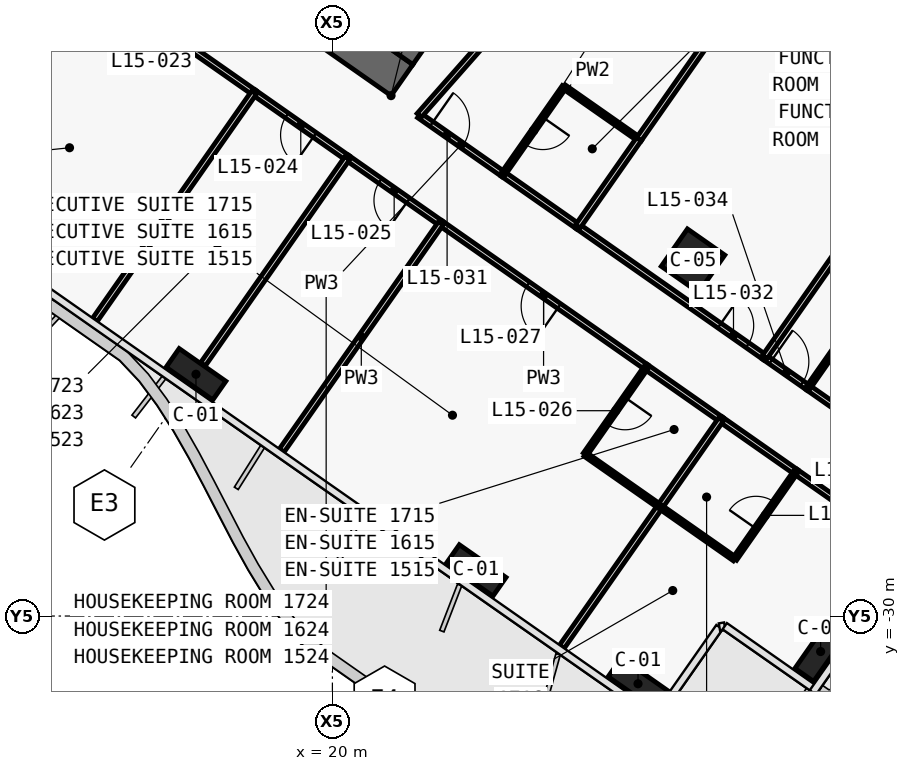
"""IFC4 building model, lengths in metres.
Left out: names, types, materials, properties, quantities, classifications, styles, units other than length and angle.
Written with IfcOpenShell. Run it as: python <this file> out.ifc"""

import sys

from ifc_helpers import new_model, si_unit, direction, frame, frame_2d, origin, origin_2d, place, context, subcontext, project, spatial, polyline, rectangle, outline, extrude, element, fill, save


model = new_model("IFC4")
c1 = context("Model", 3, precision=1e-05, world=origin(), true_north=direction((0.0, 1.0)))
c2 = subcontext(c1, "Body", "Model", "MODEL_VIEW")
j1 = project(units=[si_unit("LENGTHUNIT", "METRE"), si_unit("PLANEANGLEUNIT", "RADIAN")], contexts=[c1])
p1 = place(None, origin())
s1 = spatial("IfcSite", under=j1, at=p1, CompositionType="ELEMENT")
p2 = place(p1, origin())
s2 = spatial("IfcBuilding", under=s1, at=p2, CompositionType="ELEMENT")
p3 = place(p2, frame((0.0, 0.0, 79.7)))
s3 = spatial("IfcBuildingStorey", under=s2, at=p3, CompositionType="ELEMENT", Elevation=79.7)
p4 = place(p3, frame((-0.037, -0.585, 0.0), z_axis=(0.0, 0.0, 1.0), x_axis=(0.819157152511, -0.573569140985, 0.0)))
e1 = element("IfcWall", 1, at=p4, inside=s3, PredefinedType="SHEAR", context=c2, shape_type="SweptSolid", body=[
    extrude(outline(polyline([(26.695, 0.5), (0.0, 0.5), (0.7, -0.5), (26.695, -0.5), (26.695, 0.5)])), origin(), (0.0, 0.0, 1.0), 3.6),
])
p5 = place(p4, frame((1.245, 0.0, 0.0)))
e2 = element("IfcOpeningElement", 2, at=p5, cuts=e1, PredefinedType="OPENING", context=c2, shape_type="SweptSolid", body=[
    extrude(rectangle(XDim=1.5, YDim=2.1, at=frame_2d((0.75, 1.05))), frame((0.0, 0.51, 0.0), z_axis=(0.0, -1.0, 0.0), x_axis=(1.0, 0.0, 0.0)), (0.0, 0.0, 1.0), 1.02),
])
p6 = place(p4, frame((12.445, 0.0, 0.0)))
e3 = element("IfcOpeningElement", 3, at=p6, cuts=e1, PredefinedType="OPENING", context=c2, shape_type="SweptSolid", body=[
    extrude(rectangle(XDim=1.5, YDim=2.1, at=frame_2d((0.75, 1.05))), frame((0.0, 0.51, 0.0), z_axis=(0.0, -1.0, 0.0), x_axis=(1.0, 0.0, 0.0)), (0.0, 0.0, 1.0), 1.02),
])
p7 = place(p3, frame((21.708, -15.2, 0.0), z_axis=(0.0, 0.0, 1.0), x_axis=(0.573576324356, 0.819152122709, 0.0)))
e4 = element("IfcWall", 4, at=p7, inside=s3, PredefinedType="SHEAR", context=c2, shape_type="SweptSolid", body=[
    extrude(outline(polyline([(9.2, 0.5), (0.0, 0.5), (0.0, -0.5), (9.2, -0.5), (9.2, 0.5)])), origin(), (0.0, 0.0, 1.0), 3.6),
])
p8 = place(p7, frame((6.1, 0.0, 0.0)))
e5 = element("IfcOpeningElement", 5, at=p8, cuts=e4, PredefinedType="OPENING", context=c2, shape_type="SweptSolid", body=[
    extrude(rectangle(XDim=1.8, YDim=2.1, at=frame_2d((0.9, 1.05))), frame((0.0, 0.51, 0.0), z_axis=(0.0, -1.0, 0.0), x_axis=(1.0, 0.0, 0.0)), (0.0, 0.0, 1.0), 1.02),
])
p9 = place(p7, frame((1.9, 0.0, 0.0)))
e6 = element("IfcOpeningElement", 6, at=p9, cuts=e4, PredefinedType="OPENING", context=c2, shape_type="SweptSolid", body=[
    extrude(rectangle(XDim=1.8, YDim=2.1, at=frame_2d((0.9, 1.05))), frame((0.0, 0.51, 0.0), z_axis=(0.0, -1.0, 0.0), x_axis=(1.0, 0.0, 0.0)), (0.0, 0.0, 1.0), 1.02),
])
for number, where, z_axis, x_axis in (
    (7, (16.41, -23.637, 0.0), (0.0, 0.0, 1.0), (0.819, -0.574, 0.0)),
    (8, (23.782, -28.799, 0.0), (0.0, 0.0, 1.0), (0.819, -0.574, 0.0)),
    (9, (28.042, -31.782, 0.0), (0.0, 0.0, 1.0), (0.819, -0.574, 0.0)),
    (10, (32.847, -30.935, 0.0), (0.0, 0.0, 1.0), (0.574, 0.819, 0.0)),
):
    element("IfcColumn", number, at=place(p3, frame(where, z_axis=z_axis, x_axis=x_axis)), inside=s3, PredefinedType="COLUMN", context=c2, shape_type="SweptSolid", body=[
        extrude(rectangle(XDim=1.5, YDim=0.6, at=origin_2d()), origin(), (0.0, 0.0, 1.0), 3.6),
    ])
p10 = place(p3, frame((29.49, -20.649, 0.0), z_axis=(0.0, 0.0, 1.0), x_axis=(0.819152044289, -0.573576436351, 0.0)))
e11 = element("IfcColumn", 11, at=p10, inside=s3, PredefinedType="COLUMN", context=c2, shape_type="SweptSolid", body=[
    extrude(rectangle(XDim=1.2, YDim=1.2, at=origin_2d()), origin(), (0.0, 0.0, 1.0), 3.6),
])
p11 = place(p3, frame((22.284, -16.824, 0.0), z_axis=(0.0, 0.0, 1.0), x_axis=(0.819176640776, -0.573541307325, 0.0)))
e12 = element("IfcWall", 12, at=p11, inside=s3, PredefinedType="PARTITIONING", context=c2, shape_type="SweptSolid", body=[
    extrude(rectangle(XDim=2.698, YDim=0.15, at=frame_2d((1.349, 0.0))), origin(), (0.0, 0.0, 1.0), 3.32),
])
p12 = place(p11, frame((0.396, 0.0, 0.0)))
e13 = element("IfcOpeningElement", 13, at=p12, cuts=e12, PredefinedType="OPENING", context=c2, shape_type="SweptSolid", body=[
    extrude(rectangle(XDim=1.0, YDim=2.1, at=frame_2d((0.5, 1.05))), frame((0.0, 0.085, 0.0), z_axis=(0.0, -1.0, 0.0), x_axis=(1.0, 0.0, 0.0)), (0.0, 0.0, 1.0), 0.17),
])
p13 = place(p3, frame((24.491, -18.369, 0.0), z_axis=(0.0, 0.0, 1.0), x_axis=(0.819179439794, -0.573537309527, 0.0)))
e14 = element("IfcWall", 14, at=p13, inside=s3, PredefinedType="PARTITIONING", context=c2, shape_type="SweptSolid", body=[
    extrude(rectangle(XDim=2.404, YDim=0.15, at=frame_2d((1.202, 0.0))), origin(), (0.0, 0.0, 1.0), 3.32),
])
p14 = place(p3, frame((26.457, -19.746, 0.0), z_axis=(0.0, 0.0, 1.0), x_axis=(0.819165052243, -0.573557858619, 0.0)))
e15 = element("IfcWall", 15, at=p14, inside=s3, PredefinedType="PARTITIONING", context=c2, shape_type="SweptSolid", body=[
    extrude(rectangle(XDim=6.004, YDim=0.15, at=frame_2d((3.002, 0.0))), origin(), (0.0, 0.0, 1.0), 2.6),
])
p15 = place(p14, frame((4.552, 0.0, 0.0)))
e16 = element("IfcOpeningElement", 16, at=p15, cuts=e15, PredefinedType="OPENING", context=c2, shape_type="SweptSolid", body=[
    extrude(rectangle(XDim=0.9, YDim=2.1, at=frame_2d((0.45, 1.05))), frame((0.0, 0.085, 0.0), z_axis=(0.0, -1.0, 0.0), x_axis=(1.0, 0.0, 0.0)), (0.0, 0.0, 1.0), 0.17),
])
p16 = place(p3, frame((31.372, -23.188, 0.0), z_axis=(0.0, 0.0, 1.0), x_axis=(0.819199220913, -0.573509055252, 0.0)))
e17 = element("IfcWall", 17, at=p16, inside=s3, PredefinedType="PARTITIONING", context=c2, shape_type="SweptSolid", body=[
    extrude(rectangle(XDim=1.403, YDim=0.15, at=frame_2d((0.702, 0.0))), origin(), (0.0, 0.0, 1.0), 3.32),
])
p17 = place(p16, frame((0.202, 0.0, 0.0)))
e18 = element("IfcOpeningElement", 18, at=p17, cuts=e17, PredefinedType="OPENING", context=c2, shape_type="SweptSolid", body=[
    extrude(rectangle(XDim=1.0, YDim=2.1, at=frame_2d((0.5, 1.05))), frame((0.0, 0.085, 0.0), z_axis=(0.0, -1.0, 0.0), x_axis=(1.0, 0.0, 0.0)), (0.0, 0.0, 1.0), 0.17),
])
p18 = place(p3, frame((32.519, -23.99, 0.0), z_axis=(0.0, 0.0, 1.0), x_axis=(0.819189013667, -0.573523634986, 0.0)))
e19 = element("IfcWall", 19, at=p18, inside=s3, PredefinedType="PARTITIONING", context=c2, shape_type="SweptSolid", body=[
    extrude(rectangle(XDim=1.604, YDim=0.15, at=frame_2d((0.802, 0.0))), origin(), (0.0, 0.0, 1.0), 3.32),
])
p19 = place(p3, frame((17.941, -16.224, 0.0), z_axis=(0.0, 0.0, 1.0), x_axis=(-0.819153746897, 0.573574004767, 0.0)))
e20 = element("IfcWall", 20, at=p19, inside=s3, PredefinedType="PARTITIONING", context=c2, shape_type="SweptSolid", body=[
    extrude(rectangle(XDim=6.603, YDim=0.15, at=frame_2d((3.302, 0.0))), origin(), (0.0, 0.0, 1.0), 2.6),
])
p20 = place(p19, frame((2.802, 0.0, 0.0)))
e21 = element("IfcOpeningElement", 21, at=p20, cuts=e20, PredefinedType="OPENING", context=c2, shape_type="SweptSolid", body=[
    extrude(rectangle(XDim=1.0, YDim=2.1, at=frame_2d((0.5, 1.05))), frame((0.0, 0.085, 0.0), z_axis=(0.0, -1.0, 0.0), x_axis=(1.0, 0.0, 0.0)), (0.0, 0.0, 1.0), 0.17),
])
p21 = place(p3, frame((20.398, -17.945, 0.0), z_axis=(0.0, 0.0, 1.0), x_axis=(-0.819128818764, 0.573609604409, 0.0)))
e22 = element("IfcWall", 22, at=p21, inside=s3, PredefinedType="PARTITIONING", context=c2, shape_type="SweptSolid", body=[
    extrude(rectangle(XDim=3.004, YDim=0.15, at=frame_2d((1.502, 0.0))), origin(), (0.0, 0.0, 1.0), 2.6),
])
p22 = place(p21, frame((1.052, 0.0, 0.0)))
e23 = element("IfcOpeningElement", 23, at=p22, cuts=e22, PredefinedType="OPENING", context=c2, shape_type="SweptSolid", body=[
    extrude(rectangle(XDim=0.9, YDim=2.1, at=frame_2d((0.45, 1.05))), frame((0.0, 0.085, 0.0), z_axis=(0.0, -1.0, 0.0), x_axis=(1.0, 0.0, 0.0)), (0.0, 0.0, 1.0), 0.17),
])
p23 = place(p3, frame((22.855, -19.666, 0.0), z_axis=(0.0, 0.0, 1.0), x_axis=(-0.819128818764, 0.573609604409, 0.0)))
e24 = element("IfcWall", 24, at=p23, inside=s3, PredefinedType="PARTITIONING", context=c2, shape_type="SweptSolid", body=[
    extrude(rectangle(XDim=3.004, YDim=0.15, at=frame_2d((1.502, 0.0))), origin(), (0.0, 0.0, 1.0), 2.6),
])
p24 = place(p23, frame((1.052, 0.0, 0.0)))
e25 = element("IfcOpeningElement", 25, at=p24, cuts=e24, PredefinedType="OPENING", context=c2, shape_type="SweptSolid", body=[
    extrude(rectangle(XDim=0.9, YDim=2.1, at=frame_2d((0.45, 1.05))), frame((0.0, 0.085, 0.0), z_axis=(0.0, -1.0, 0.0), x_axis=(1.0, 0.0, 0.0)), (0.0, 0.0, 1.0), 0.17),
])
p25 = place(p3, frame((28.261, -23.451, 0.0), z_axis=(0.0, 0.0, 1.0), x_axis=(-0.819141582452, 0.573591377113, 0.0)))
e26 = element("IfcWall", 26, at=p25, inside=s3, PredefinedType="PARTITIONING", context=c2, shape_type="SweptSolid", body=[
    extrude(rectangle(XDim=6.603, YDim=0.15, at=frame_2d((3.301, 0.0))), origin(), (0.0, 0.0, 1.0), 2.6),
])
p26 = place(p25, frame((2.801, 0.0, 0.0)))
e27 = element("IfcOpeningElement", 27, at=p26, cuts=e26, PredefinedType="OPENING", context=c2, shape_type="SweptSolid", body=[
    extrude(rectangle(XDim=1.0, YDim=2.1, at=frame_2d((0.5, 1.05))), frame((0.0, 0.085, 0.0), z_axis=(0.0, -1.0, 0.0), x_axis=(1.0, 0.0, 0.0)), (0.0, 0.0, 1.0), 0.17),
])
p27 = place(p3, frame((30.228, -24.828, 0.0), z_axis=(0.0, 0.0, 1.0), x_axis=(-0.819146032251, 0.573585022335, 0.0)))
e28 = element("IfcWall", 28, at=p27, inside=s3, PredefinedType="PARTITIONING", context=c2, shape_type="SweptSolid", body=[
    extrude(rectangle(XDim=2.404, YDim=0.15, at=frame_2d((1.202, 0.0))), origin(), (0.0, 0.0, 1.0), 3.32),
])
p28 = place(p3, frame((35.141, -28.268, 0.0), z_axis=(0.0, 0.0, 1.0), x_axis=(-0.819149096931, 0.573580645591, 0.0)))
e29 = element("IfcWall", 29, at=p28, inside=s3, PredefinedType="PARTITIONING", context=c2, shape_type="SweptSolid", body=[
    extrude(rectangle(XDim=3.601, YDim=0.15, at=frame_2d((1.8, 0.0))), origin(), (0.0, 0.0, 1.0), 2.5),
])
p29 = place(p28, frame((1.2, 0.0, 0.0)))
e30 = element("IfcOpeningElement", 30, at=p29, cuts=e29, PredefinedType="OPENING", context=c2, shape_type="SweptSolid", body=[
    extrude(rectangle(XDim=1.0, YDim=2.1, at=frame_2d((0.5, 1.05))), frame((0.0, 0.085, 0.0), z_axis=(0.0, -1.0, 0.0), x_axis=(1.0, 0.0, 0.0)), (0.0, 0.0, 1.0), 0.17),
])
p30 = place(p3, frame((32.194, -26.205, 0.0), z_axis=(0.0, 0.0, 1.0), x_axis=(-0.819146032251, 0.573585022335, 0.0)))
e31 = element("IfcWall", 31, at=p30, inside=s3, PredefinedType="PARTITIONING", context=c2, shape_type="SweptSolid", body=[
    extrude(rectangle(XDim=2.404, YDim=0.15, at=frame_2d((1.202, 0.0))), origin(), (0.0, 0.0, 1.0), 3.32),
])
p31 = place(p3, frame((26.098, -16.076, 0.0), z_axis=(0.0, 0.0, 1.0), x_axis=(-0.573550118428, -0.819170471667, 0.0)))
e32 = element("IfcWall", 32, at=p31, inside=s3, PredefinedType="PARTITIONING", context=c2, shape_type="SweptSolid", body=[
    extrude(rectangle(XDim=2.8, YDim=0.12, at=frame_2d((1.4, 0.0))), origin(), (0.0, 0.0, 1.0), 2.6),
])
p32 = place(p31, frame((0.975, 0.0, 0.0)))
e33 = element("IfcOpeningElement", 33, at=p32, cuts=e32, PredefinedType="OPENING", context=c2, shape_type="SweptSolid", body=[
    extrude(rectangle(XDim=0.85, YDim=2.05, at=frame_2d((0.425, 1.025))), frame((0.0, 0.07, 0.0), z_axis=(0.0, -1.0, 0.0), x_axis=(1.0, 0.0, 0.0)), (0.0, 0.0, 1.0), 0.14),
])
p33 = place(p3, frame((28.065, -17.453, 0.0), z_axis=(0.0, 0.0, 1.0), x_axis=(-0.819155442668, 0.573571582932, 0.0)))
e34 = element("IfcWall", 34, at=p33, inside=s3, PredefinedType="PARTITIONING", context=c2, shape_type="SweptSolid", body=[
    extrude(rectangle(XDim=2.4, YDim=0.12, at=frame_2d((1.2, 0.0))), origin(), (0.0, 0.0, 1.0), 3.32),
])
p34 = place(p3, frame((32.94, -10.491, 0.0), z_axis=(0.0, 0.0, 1.0), x_axis=(-0.573593433868, -0.819140142237, 0.0)))
e35 = element("IfcWall", 35, at=p34, inside=s3, PredefinedType="PARTITIONING", context=c2, shape_type="SweptSolid", body=[
    extrude(rectangle(XDim=8.499, YDim=0.15, at=frame_2d((4.25, 0.0))), origin(), (0.0, 0.0, 1.0), 2.6),
])
p35 = place(p3, frame((22.285, -16.825, 0.0), z_axis=(0.0, 0.0, 1.0), x_axis=(0.661551268245, 0.749899939647, 0.0)))
e36 = element("IfcWall", 36, at=p35, inside=s3, PredefinedType="PARTITIONING", context=c2, shape_type="SweptSolid", body=[
    extrude(rectangle(XDim=6.541, YDim=0.15, at=frame_2d((3.271, 0.0))), origin(), (0.0, 0.0, 1.0), 2.6),
])
p36 = place(p3, frame((28.064, -17.454, 0.0), z_axis=(0.0, 0.0, 1.0), x_axis=(-0.573550118428, -0.819170471667, 0.0)))
e37 = element("IfcWall", 37, at=p36, inside=s3, PredefinedType="PARTITIONING", context=c2, shape_type="SweptSolid", body=[
    extrude(rectangle(XDim=2.8, YDim=0.15, at=frame_2d((1.4, 0.0))), origin(), (0.0, 0.0, 1.0), 2.6),
])
p37 = place(p3, frame((37.855, -13.932, 0.0), z_axis=(0.0, 0.0, 1.0), x_axis=(-0.573571089604, -0.819155788095, 0.0)))
e38 = element("IfcWall", 38, at=p37, inside=s3, PredefinedType="PARTITIONING", context=c2, shape_type="SweptSolid", body=[
    extrude(rectangle(XDim=11.3, YDim=0.15, at=frame_2d((5.65, 0.0))), origin(), (0.0, 0.0, 1.0), 2.5),
])
p38 = place(p3, frame((34.01, -21.861, 0.0), z_axis=(0.0, 0.0, 1.0), x_axis=(-0.573537965655, -0.819178980414, 0.0)))
e39 = element("IfcWall", 39, at=p38, inside=s3, PredefinedType="PARTITIONING", context=c2, shape_type="SweptSolid", body=[
    extrude(rectangle(XDim=2.6, YDim=0.12, at=frame_2d((1.3, 0.0))), origin(), (0.0, 0.0, 1.0), 2.6),
])
p39 = place(p38, frame((0.875, 0.0, 0.0)))
e40 = element("IfcOpeningElement", 40, at=p39, cuts=e39, PredefinedType="OPENING", context=c2, shape_type="SweptSolid", body=[
    extrude(rectangle(XDim=0.85, YDim=2.05, at=frame_2d((0.425, 1.025))), frame((0.0, 0.07, 0.0), z_axis=(0.0, -1.0, 0.0), x_axis=(1.0, 0.0, 0.0)), (0.0, 0.0, 1.0), 0.14),
])
p40 = place(p3, frame((17.939, -16.223, 0.0), z_axis=(0.0, 0.0, 1.0), x_axis=(-0.573594765376, -0.819139209862, 0.0)))
e41 = element("IfcWall", 41, at=p40, inside=s3, PredefinedType="PARTITIONING", context=c2, shape_type="SweptSolid", body=[
    extrude(rectangle(XDim=7.3, YDim=0.15, at=frame_2d((3.65, 0.0))), origin(), (0.0, 0.0, 1.0), 2.5),
])
p41 = place(p3, frame((20.396, -17.944, 0.0), z_axis=(0.0, 0.0, 1.0), x_axis=(-0.57359826181, -0.819136761505, 0.0)))
e42 = element("IfcWall", 42, at=p41, inside=s3, PredefinedType="PARTITIONING", context=c2, shape_type="SweptSolid", body=[
    extrude(rectangle(XDim=6.63, YDim=0.15, at=frame_2d((3.315, 0.0))), origin(), (0.0, 0.0, 1.0), 2.6),
])
p42 = place(p3, frame((22.854, -19.665, 0.0), z_axis=(0.0, 0.0, 1.0), x_axis=(-0.573572324301, -0.819154923562, 0.0)))
e43 = element("IfcWall", 43, at=p42, inside=s3, PredefinedType="PARTITIONING", context=c2, shape_type="SweptSolid", body=[
    extrude(rectangle(XDim=7.3, YDim=0.15, at=frame_2d((3.65, 0.0))), origin(), (0.0, 0.0, 1.0), 2.5),
])
p43 = place(p3, frame((28.26, -23.45, 0.0), z_axis=(0.0, 0.0, 1.0), x_axis=(-0.573608623498, -0.819129505664, 0.0)))
e44 = element("IfcWall", 44, at=p43, inside=s3, PredefinedType="PARTITIONING", context=c2, shape_type="SweptSolid", body=[
    extrude(rectangle(XDim=2.8, YDim=0.12, at=frame_2d((1.4, 0.0))), origin(), (0.0, 0.0, 1.0), 3.32),
])
p44 = place(p43, frame((0.975, 0.0, 0.0)))
e45 = element("IfcOpeningElement", 45, at=p44, cuts=e44, PredefinedType="OPENING", context=c2, shape_type="SweptSolid", body=[
    extrude(rectangle(XDim=0.85, YDim=2.05, at=frame_2d((0.425, 1.025))), frame((0.0, 0.07, 0.0), z_axis=(0.0, -1.0, 0.0), x_axis=(1.0, 0.0, 0.0)), (0.0, 0.0, 1.0), 0.14),
])
p45 = place(p3, frame((26.654, -25.745, 0.0), z_axis=(0.0, 0.0, 1.0), x_axis=(0.819188907105, -0.573523787192, 0.0)))
e46 = element("IfcWall", 46, at=p45, inside=s3, PredefinedType="PARTITIONING", context=c2, shape_type="SweptSolid", body=[
    extrude(rectangle(XDim=2.4, YDim=0.12, at=frame_2d((1.2, 0.0))), origin(), (0.0, 0.0, 1.0), 3.32),
])
p46 = place(p3, frame((28.62, -27.121, 0.0), z_axis=(0.0, 0.0, 1.0), x_axis=(-0.573589807488, -0.819142681555, 0.0)))
e47 = element("IfcWall", 47, at=p46, inside=s3, PredefinedType="PARTITIONING", context=c2, shape_type="SweptSolid", body=[
    extrude(rectangle(XDim=4.499, YDim=0.15, at=frame_2d((2.25, 0.0))), origin(), (0.0, 0.0, 1.0), 2.5),
])
p47 = place(p3, frame((30.226, -24.827, 0.0), z_axis=(0.0, 0.0, 1.0), x_axis=(-0.573608623498, -0.819129505664, 0.0)))
e48 = element("IfcWall", 48, at=p47, inside=s3, PredefinedType="PARTITIONING", context=c2, shape_type="SweptSolid", body=[
    extrude(rectangle(XDim=2.8, YDim=0.15, at=frame_2d((1.4, 0.0))), origin(), (0.0, 0.0, 1.0), 3.32),
])
p48 = place(p3, frame((28.62, -27.121, 0.0), z_axis=(0.0, 0.0, 1.0), x_axis=(0.819141114317, -0.573592045652, 0.0)))
e49 = element("IfcWall", 49, at=p48, inside=s3, PredefinedType="PARTITIONING", context=c2, shape_type="SweptSolid", body=[
    extrude(rectangle(XDim=2.4, YDim=0.12, at=frame_2d((1.2, 0.0))), origin(), (0.0, 0.0, 1.0), 3.32),
])
p49 = place(p3, frame((30.587, -28.498, 0.0), z_axis=(0.0, 0.0, 1.0), x_axis=(0.573608623498, 0.819129505664, 0.0)))
e50 = element("IfcWall", 50, at=p49, inside=s3, PredefinedType="PARTITIONING", context=c2, shape_type="SweptSolid", body=[
    extrude(rectangle(XDim=2.8, YDim=0.12, at=frame_2d((1.4, 0.0))), origin(), (0.0, 0.0, 1.0), 3.32),
])
p50 = place(p49, frame((0.975, 0.0, 0.0)))
e51 = element("IfcOpeningElement", 51, at=p50, cuts=e50, PredefinedType="OPENING", context=c2, shape_type="SweptSolid", body=[
    extrude(rectangle(XDim=0.85, YDim=2.05, at=frame_2d((0.425, 1.025))), frame((0.0, 0.07, 0.0), z_axis=(0.0, -1.0, 0.0), x_axis=(1.0, 0.0, 0.0)), (0.0, 0.0, 1.0), 0.14),
])
p51 = place(p22, origin())
e52 = element("IfcDoor", 52, at=p51, inside=s3, OperationType="SINGLE_SWING_LEFT", PredefinedType="DOOR", context=c2, shape_type="SweptSolid", body=[
    extrude(rectangle(XDim=0.9, YDim=2.1, at=frame_2d((0.45, 1.05))), frame((0.0, 0.025, 0.0), z_axis=(0.0, -1.0, 0.0), x_axis=(1.0, 0.0, 0.0)), (0.0, 0.0, 1.0), 0.05),
])
fill(e23, e52)
p52 = place(p24, origin())
e53 = element("IfcDoor", 53, at=p52, inside=s3, OperationType="SINGLE_SWING_RIGHT", PredefinedType="DOOR", context=c2, shape_type="SweptSolid", body=[
    extrude(rectangle(XDim=0.9, YDim=2.1, at=frame_2d((0.45, 1.05))), frame((0.0, 0.025, 0.0), z_axis=(0.0, -1.0, 0.0), x_axis=(1.0, 0.0, 0.0)), (0.0, 0.0, 1.0), 0.05),
])
fill(e25, e53)
p53 = place(p44, origin())
e54 = element("IfcDoor", 54, at=p53, inside=s3, OperationType="SINGLE_SWING_RIGHT", PredefinedType="DOOR", context=c2, shape_type="SweptSolid", body=[
    extrude(rectangle(XDim=0.85, YDim=2.05, at=frame_2d((0.425, 1.025))), frame((0.0, 0.025, 0.0), z_axis=(0.0, -1.0, 0.0), x_axis=(1.0, 0.0, 0.0)), (0.0, 0.0, 1.0), 0.05),
])
fill(e45, e54)
p54 = place(p26, origin())
e55 = element("IfcDoor", 55, at=p54, inside=s3, OperationType="SINGLE_SWING_RIGHT", PredefinedType="DOOR", context=c2, shape_type="SweptSolid", body=[
    extrude(rectangle(XDim=1.0, YDim=2.1, at=frame_2d((0.5, 1.05))), frame((0.0, 0.025, 0.0), z_axis=(0.0, -1.0, 0.0), x_axis=(1.0, 0.0, 0.0)), (0.0, 0.0, 1.0), 0.05),
])
fill(e27, e55)
p55 = place(p50, origin())
e56 = element("IfcDoor", 56, at=p55, inside=s3, OperationType="SINGLE_SWING_RIGHT", PredefinedType="DOOR", context=c2, shape_type="SweptSolid", body=[
    extrude(rectangle(XDim=0.85, YDim=2.05, at=frame_2d((0.425, 1.025))), frame((0.0, 0.025, 0.0), z_axis=(0.0, -1.0, 0.0), x_axis=(1.0, 0.0, 0.0)), (0.0, 0.0, 1.0), 0.05),
])
fill(e51, e56)
p56 = place(p32, origin())
e57 = element("IfcDoor", 57, at=p56, inside=s3, OperationType="SINGLE_SWING_RIGHT", PredefinedType="DOOR", context=c2, shape_type="SweptSolid", body=[
    extrude(rectangle(XDim=0.85, YDim=2.05, at=frame_2d((0.425, 1.025))), frame((0.0, 0.025, 0.0), z_axis=(0.0, -1.0, 0.0), x_axis=(1.0, 0.0, 0.0)), (0.0, 0.0, 1.0), 0.05),
])
fill(e33, e57)
p57 = place(p12, origin())
e58 = element("IfcDoor", 58, at=p57, inside=s3, OperationType="SINGLE_SWING_LEFT", PredefinedType="DOOR", context=c2, shape_type="SweptSolid", body=[
    extrude(rectangle(XDim=1.0, YDim=2.1, at=frame_2d((0.5, 1.05))), frame((0.0, 0.025, 0.0), z_axis=(0.0, -1.0, 0.0), x_axis=(1.0, 0.0, 0.0)), (0.0, 0.0, 1.0), 0.05),
])
fill(e13, e58)
p58 = place(p15, origin())
e59 = element("IfcDoor", 59, at=p58, inside=s3, OperationType="SINGLE_SWING_RIGHT", PredefinedType="DOOR", context=c2, shape_type="SweptSolid", body=[
    extrude(rectangle(XDim=0.9, YDim=2.1, at=frame_2d((0.45, 1.05))), frame((0.0, 0.025, 0.0), z_axis=(0.0, -1.0, 0.0), x_axis=(1.0, 0.0, 0.0)), (0.0, 0.0, 1.0), 0.05),
])
fill(e16, e59)
p59 = place(p39, origin())
e60 = element("IfcDoor", 60, at=p59, inside=s3, OperationType="SINGLE_SWING_RIGHT", PredefinedType="DOOR", context=c2, shape_type="SweptSolid", body=[
    extrude(rectangle(XDim=0.85, YDim=2.05, at=frame_2d((0.425, 1.025))), frame((0.0, 0.025, 0.0), z_axis=(0.0, -1.0, 0.0), x_axis=(1.0, 0.0, 0.0)), (0.0, 0.0, 1.0), 0.05),
])
fill(e40, e60)
p60 = place(p17, origin())
e61 = element("IfcDoor", 61, at=p60, inside=s3, OperationType="SINGLE_SWING_LEFT", PredefinedType="DOOR", context=c2, shape_type="SweptSolid", body=[
    extrude(rectangle(XDim=1.0, YDim=2.1, at=frame_2d((0.5, 1.05))), frame((0.0, 0.025, 0.0), z_axis=(0.0, -1.0, 0.0), x_axis=(1.0, 0.0, 0.0)), (0.0, 0.0, 1.0), 0.05),
])
fill(e18, e61)
save(model, sys.argv[1])
